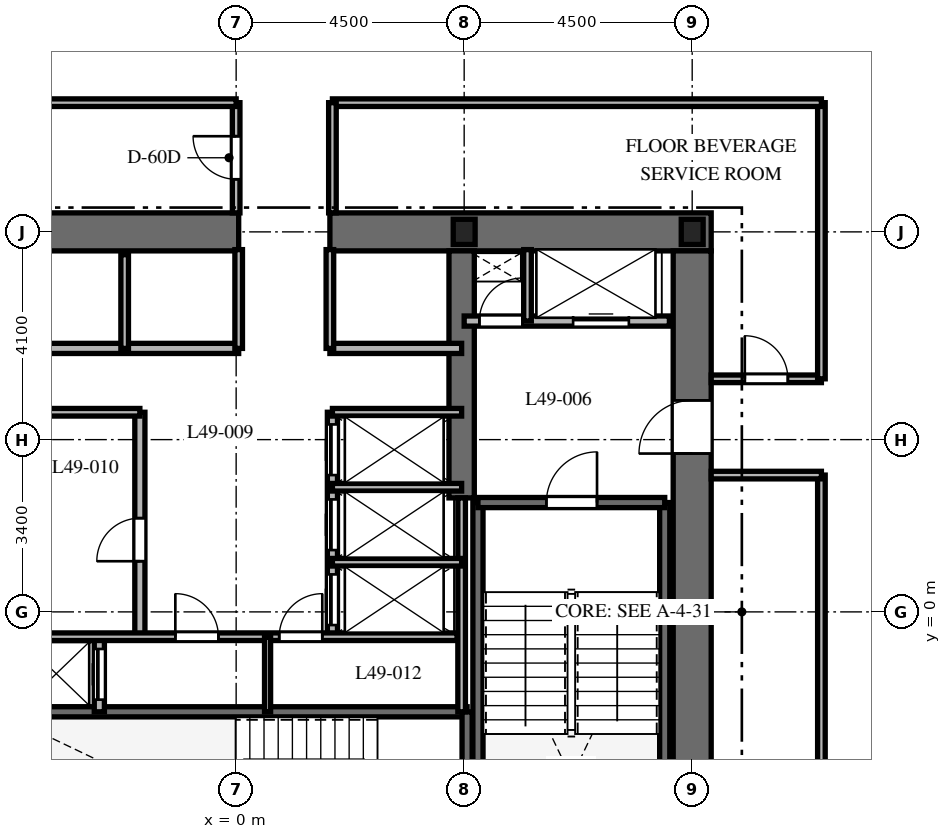
"""IFC4 building model, lengths in metres.
Left out: names, types, materials, properties, quantities, classifications, styles, units other than length and angle.
Written with IfcOpenShell. Run it as: python <this file> out.ifc"""

import sys

from ifc_helpers import new_model, si_unit, direction, frame, frame_2d, origin, origin_2d, place, context, subcontext, project, spatial, rectangle, i_section, extrude, element, fill, save


model = new_model("IFC4")
c1 = context("Model", 3, precision=1e-05, world=origin(), true_north=direction((0.0, 1.0)))
c2 = subcontext(c1, "Body", "Model", "MODEL_VIEW")
j1 = project(units=[si_unit("LENGTHUNIT", "METRE"), si_unit("PLANEANGLEUNIT", "RADIAN")], contexts=[c1])
p1 = place(None, origin())
s1 = spatial("IfcSite", under=j1, at=p1, CompositionType="ELEMENT")
p2 = place(p1, origin())
s2 = spatial("IfcBuilding", under=s1, at=p2, CompositionType="ELEMENT")
p3 = place(p2, frame((0.0, 0.0, 197.8)))
s3 = spatial("IfcBuildingStorey", under=s2, at=p3, CompositionType="ELEMENT", Elevation=197.8)
p4 = place(p3, frame((-9.375, 7.5, 0.0), z_axis=(0.0, 0.0, 1.0), x_axis=(1.0, 0.0, 0.0)))
e1 = element("IfcWall", 1, at=p4, inside=s3, PredefinedType="SHEAR", context=c2, shape_type="SweptSolid", body=[
    extrude(rectangle(XDim=9.425, YDim=0.75, at=frame_2d((4.712, 0.0))), origin(), (0.0, 0.0, 1.0), 3.7),
])
p5 = place(p3, frame((1.85, 7.5, 0.0), z_axis=(0.0, 0.0, 1.0), x_axis=(1.0, 0.0, 0.0)))
e2 = element("IfcWall", 2, at=p5, inside=s3, PredefinedType="SHEAR", context=c2, shape_type="SweptSolid", body=[
    extrude(rectangle(XDim=7.525, YDim=0.75, at=frame_2d((3.762, 0.0))), origin(), (0.0, 0.0, 1.0), 3.7),
])
p6 = place(p3, frame((9.0, -7.125, 0.0), z_axis=(0.0, 0.0, 1.0), x_axis=(0.0, 1.0, 0.0)))
e3 = element("IfcWall", 3, at=p6, inside=s3, PredefinedType="SHEAR", context=c2, shape_type="SweptSolid", body=[
    extrude(rectangle(XDim=14.25, YDim=0.75, at=frame_2d((7.125, 0.0))), origin(), (0.0, 0.0, 1.0), 3.7),
])
p7 = place(p6, frame((10.25, 0.0, 0.0)))
e4 = element("IfcOpeningElement", 4, at=p7, cuts=e3, PredefinedType="OPENING", context=c2, shape_type="SweptSolid", body=[
    extrude(rectangle(XDim=1.05, YDim=2.15, at=frame_2d((0.525, 1.075))), frame((0.0, 0.385, 0.0), z_axis=(0.0, -1.0, 0.0), x_axis=(1.0, 0.0, 0.0)), (0.0, 0.0, 1.0), 0.77),
])
p8 = place(p3, frame((4.45, 2.25, 0.0), z_axis=(0.0, 0.0, 1.0), x_axis=(0.0, 1.0, 0.0)))
e5 = element("IfcWall", 5, at=p8, inside=s3, PredefinedType="SHEAR", context=c2, shape_type="SweptSolid", body=[
    extrude(rectangle(XDim=4.875, YDim=0.5, at=frame_2d((2.438, 0.0))), origin(), (0.0, 0.0, 1.0), 3.7),
])
for number, where, z_axis, x_axis in (
    (6, (4.772, -6.985, 0.0), (0.0, 0.0, 1.0), (0.0, 1.0, 0.0)),
    (7, (8.458, -6.985, 0.0), (0.0, 0.0, 1.0), (0.0, 1.0, 0.0)),
):
    element("IfcWall", number, at=place(p3, frame(where, z_axis=z_axis, x_axis=x_axis)), inside=s3, PredefinedType="SHEAR", context=c2, shape_type="SweptSolid", body=[
        extrude(rectangle(XDim=9.143, YDim=0.2, at=frame_2d((4.572, 0.0))), origin(), (0.0, 0.0, 1.0), 3.7),
    ])
p9 = place(p3, frame((4.772, 2.158, 0.0), z_axis=(0.0, 0.0, 1.0), x_axis=(1.0, 0.0, 0.0)))
e8 = element("IfcWall", 8, at=p9, inside=s3, PredefinedType="SHEAR", context=c2, shape_type="SweptSolid", body=[
    extrude(rectangle(XDim=3.686, YDim=0.2, at=frame_2d((1.843, 0.0))), origin(), (0.0, 0.0, 1.0), 3.7),
])
p10 = place(p9, frame((1.35, 0.0, 0.0)))
e9 = element("IfcOpeningElement", 9, at=p10, cuts=e8, PredefinedType="OPENING", context=c2, shape_type="SweptSolid", body=[
    extrude(rectangle(XDim=1.0, YDim=2.15, at=frame_2d((0.5, 1.075))), frame((0.0, 0.11, 0.0), z_axis=(0.0, -1.0, 0.0), x_axis=(1.0, 0.0, 0.0)), (0.0, 0.0, 1.0), 0.22),
])
p11 = place(p3, frame((-4.608, -1.972, 0.0), z_axis=(0.0, 0.0, 1.0), x_axis=(1.0, 0.0, 0.0)))
e10 = element("IfcWall", 10, at=p11, inside=s3, PredefinedType="SHEAR", context=c2, shape_type="SweptSolid", body=[
    extrude(rectangle(XDim=9.166, YDim=0.2, at=frame_2d((4.583, 0.0))), origin(), (0.0, 0.0, 1.0), 3.7),
])
p12 = place(p3, frame((4.558, -5.658, 0.0), z_axis=(0.0, 0.0, 1.0), x_axis=(0.0, 1.0, 0.0)))
e11 = element("IfcWall", 11, at=p12, inside=s3, PredefinedType="SHEAR", context=c2, shape_type="SweptSolid", body=[
    extrude(rectangle(XDim=3.686, YDim=0.2, at=frame_2d((1.843, 0.0))), origin(), (0.0, 0.0, 1.0), 3.7),
])
for number, where, z_axis, x_axis in (
    (12, (9.0, 7.5, 0.0), (0.0, 0.0, 1.0), (1.0, 0.0, 0.0)),
    (13, (4.5, 7.5, 0.0), (0.0, 0.0, 1.0), (1.0, 0.0, 0.0)),
):
    element("IfcColumn", number, at=place(p3, frame(where, z_axis=z_axis, x_axis=x_axis)), inside=s3, PredefinedType="COLUMN", context=c2, shape_type="SweptSolid", body=[
        extrude(i_section(OverallWidth=0.432, OverallDepth=0.498, WebThickness=0.056, FlangeThickness=0.089, at=origin_2d()), origin(), (0.0, 0.0, 1.0), 3.7),
    ])
p13 = place(p3, frame((4.5, 5.74, 0.0), z_axis=(0.0, 0.0, 1.0), x_axis=(1.0, 0.0, 0.0)))
e14 = element("IfcWall", 14, at=p13, inside=s3, PredefinedType="PARTITIONING", context=c2, shape_type="SweptSolid", body=[
    extrude(rectangle(XDim=4.05, YDim=0.2, at=frame_2d((2.025, 0.0))), origin(), (0.0, 0.0, 1.0), 3.35),
])
p14 = place(p13, frame((0.3, 0.0, 0.0)))
e15 = element("IfcOpeningElement", 15, at=p14, cuts=e14, PredefinedType="OPENING", context=c2, shape_type="SweptSolid", body=[
    extrude(rectangle(XDim=0.85, YDim=2.03, at=frame_2d((0.425, 1.015))), frame((0.0, 0.11, 0.0), z_axis=(0.0, -1.0, 0.0), x_axis=(1.0, 0.0, 0.0)), (0.0, 0.0, 1.0), 0.22),
])
p15 = place(p13, frame((2.15, 0.0, 0.0)))
e16 = element("IfcOpeningElement", 16, at=p15, cuts=e14, PredefinedType="OPENING", context=c2, shape_type="SweptSolid", body=[
    extrude(rectangle(XDim=1.1, YDim=2.2, at=frame_2d((0.55, 1.1))), frame((0.0, 0.11, 0.0), z_axis=(0.0, -1.0, 0.0), x_axis=(1.0, 0.0, 0.0)), (0.0, 0.0, 1.0), 0.22),
])
p16 = place(p3, frame((5.75, 5.74, 0.0), z_axis=(0.0, 0.0, 1.0), x_axis=(0.0, 1.0, 0.0)))
e17 = element("IfcWall", 17, at=p16, inside=s3, PredefinedType="PARTITIONING", context=c2, shape_type="SweptSolid", body=[
    extrude(rectangle(XDim=1.41, YDim=0.15, at=frame_2d((0.705, 0.0))), origin(), (0.0, 0.0, 1.0), 3.35),
])
p17 = place(p3, frame((-2.7, -1.972, 0.0), z_axis=(0.0, 0.0, 1.0), x_axis=(0.0, 1.0, 0.0)))
e18 = element("IfcWall", 18, at=p17, inside=s3, PredefinedType="PARTITIONING", context=c2, shape_type="SweptSolid", body=[
    extrude(rectangle(XDim=1.472, YDim=0.2, at=frame_2d((0.736, 0.0))), origin(), (0.0, 0.0, 1.0), 3.35),
])
p18 = place(p17, frame((0.24, 0.0, 0.0)))
e19 = element("IfcOpeningElement", 19, at=p18, cuts=e18, PredefinedType="OPENING", context=c2, shape_type="SweptSolid", body=[
    extrude(rectangle(XDim=1.0, YDim=2.2, at=frame_2d((0.5, 1.1))), frame((0.0, 0.11, 0.0), z_axis=(0.0, -1.0, 0.0), x_axis=(1.0, 0.0, 0.0)), (0.0, 0.0, 1.0), 0.22),
])
p19 = place(p3, frame((-4.45, 5.2, 0.0), z_axis=(0.0, 0.0, 1.0), x_axis=(1.0, 0.0, 0.0)))
e20 = element("IfcWall", 20, at=p19, inside=s3, PredefinedType="PARTITIONING", context=c2, shape_type="SweptSolid", body=[
    extrude(rectangle(XDim=4.5, YDim=0.2, at=frame_2d((2.25, 0.0))), origin(), (0.0, 0.0, 1.0), 3.35),
])
p20 = place(p3, frame((1.85, 5.2, 0.0), z_axis=(0.0, 0.0, 1.0), x_axis=(1.0, 0.0, 0.0)))
e21 = element("IfcWall", 21, at=p20, inside=s3, PredefinedType="PARTITIONING", context=c2, shape_type="SweptSolid", body=[
    extrude(rectangle(XDim=2.6, YDim=0.2, at=frame_2d((1.3, 0.0))), origin(), (0.0, 0.0, 1.0), 3.35),
])
p21 = place(p3, frame((-2.2, 5.2, 0.0), z_axis=(0.0, 0.0, 1.0), x_axis=(0.0, 1.0, 0.0)))
e22 = element("IfcWall", 22, at=p21, inside=s3, PredefinedType="PARTITIONING", context=c2, shape_type="SweptSolid", body=[
    extrude(rectangle(XDim=1.85, YDim=0.15, at=frame_2d((0.925, 0.0))), origin(), (0.0, 0.0, 1.0), 3.35),
])
for number, where, z_axis, x_axis in (
    (23, (0.05, 5.2, 0.0), (0.0, 0.0, 1.0), (0.0, 1.0, 0.0)),
    (24, (1.85, 5.2, 0.0), (0.0, 0.0, 1.0), (0.0, 1.0, 0.0)),
):
    element("IfcWall", number, at=place(p3, frame(where, z_axis=z_axis, x_axis=x_axis)), inside=s3, PredefinedType="PARTITIONING", context=c2, shape_type="SweptSolid", body=[
        extrude(rectangle(XDim=1.95, YDim=0.15, at=frame_2d((0.975, 0.0))), origin(), (0.0, 0.0, 1.0), 3.35),
    ])
p22 = place(p3, frame((4.45, -1.972, 0.0), z_axis=(0.0, 0.0, 1.0), x_axis=(0.0, 1.0, 0.0)))
e25 = element("IfcWall", 25, at=p22, inside=s3, PredefinedType="PARTITIONING", context=c2, shape_type="SweptSolid", body=[
    extrude(rectangle(XDim=4.222, YDim=0.15, at=frame_2d((2.111, 0.0))), origin(), (0.0, 0.0, 1.0), 3.35),
])
p23 = place(p3, frame((-1.9, -0.5, 0.0), z_axis=(0.0, 0.0, 1.0), x_axis=(0.0, 1.0, 0.0)))
e26 = element("IfcWall", 26, at=p23, inside=s3, PredefinedType="PARTITIONING", context=c2, shape_type="SweptSolid", body=[
    extrude(rectangle(XDim=4.44, YDim=0.2, at=frame_2d((2.22, 0.0))), origin(), (0.0, 0.0, 1.0), 3.35),
])
p24 = place(p23, frame((1.5, 0.0, 0.0)))
e27 = element("IfcOpeningElement", 27, at=p24, cuts=e26, PredefinedType="OPENING", context=c2, shape_type="SweptSolid", body=[
    extrude(rectangle(XDim=0.85, YDim=2.03, at=frame_2d((0.425, 1.015))), frame((0.0, 0.11, 0.0), z_axis=(0.0, -1.0, 0.0), x_axis=(1.0, 0.0, 0.0)), (0.0, 0.0, 1.0), 0.22),
])
p25 = place(p3, frame((-4.45, 3.94, 0.0), z_axis=(0.0, 0.0, 1.0), x_axis=(1.0, 0.0, 0.0)))
e28 = element("IfcWall", 28, at=p25, inside=s3, PredefinedType="PARTITIONING", context=c2, shape_type="SweptSolid", body=[
    extrude(rectangle(XDim=2.55, YDim=0.15, at=frame_2d((1.275, 0.0))), origin(), (0.0, 0.0, 1.0), 3.35),
])
p26 = place(p3, frame((1.9, -0.5, 0.0), z_axis=(0.0, 0.0, 1.0), x_axis=(0.0, 1.0, 0.0)))
e29 = element("IfcWall", 29, at=p26, inside=s3, PredefinedType="PARTITIONING", context=c2, shape_type="SweptSolid", body=[
    extrude(rectangle(XDim=4.44, YDim=0.2, at=frame_2d((2.22, 0.0))), origin(), (0.0, 0.0, 1.0), 3.35),
])
p27 = place(p26, frame((0.24, 0.0, 0.0)))
e30 = element("IfcOpeningElement", 30, at=p27, cuts=e29, PredefinedType="OPENING", context=c2, shape_type="SweptSolid", body=[
    extrude(rectangle(XDim=1.0, YDim=2.2, at=frame_2d((0.5, 1.1))), frame((0.0, 0.11, 0.0), z_axis=(0.0, -1.0, 0.0), x_axis=(1.0, 0.0, 0.0)), (0.0, 0.0, 1.0), 0.22),
])
p28 = place(p26, frame((1.72, 0.0, 0.0)))
e31 = element("IfcOpeningElement", 31, at=p28, cuts=e29, PredefinedType="OPENING", context=c2, shape_type="SweptSolid", body=[
    extrude(rectangle(XDim=1.0, YDim=2.2, at=frame_2d((0.5, 1.1))), frame((0.0, 0.11, 0.0), z_axis=(0.0, -1.0, 0.0), x_axis=(1.0, 0.0, 0.0)), (0.0, 0.0, 1.0), 0.22),
])
p29 = place(p26, frame((3.2, 0.0, 0.0)))
e32 = element("IfcOpeningElement", 32, at=p29, cuts=e29, PredefinedType="OPENING", context=c2, shape_type="SweptSolid", body=[
    extrude(rectangle(XDim=1.0, YDim=2.2, at=frame_2d((0.5, 1.1))), frame((0.0, 0.11, 0.0), z_axis=(0.0, -1.0, 0.0), x_axis=(1.0, 0.0, 0.0)), (0.0, 0.0, 1.0), 0.22),
])
for number, where, z_axis, x_axis in (
    (33, (1.9, 3.94, 0.0), (0.0, 0.0, 1.0), (1.0, 0.0, 0.0)),
    (34, (1.9, 0.98, 0.0), (0.0, 0.0, 1.0), (1.0, 0.0, 0.0)),
    (35, (1.9, 2.46, 0.0), (0.0, 0.0, 1.0), (1.0, 0.0, 0.0)),
):
    element("IfcWall", number, at=place(p3, frame(where, z_axis=z_axis, x_axis=x_axis)), inside=s3, PredefinedType="PARTITIONING", context=c2, shape_type="SweptSolid", body=[
        extrude(rectangle(XDim=2.55, YDim=0.15, at=frame_2d((1.275, 0.0))), origin(), (0.0, 0.0, 1.0), 3.35),
    ])
p30 = place(p3, frame((-4.36, -0.49, 0.0), z_axis=(0.0, 0.0, 1.0), x_axis=(1.0, 0.0, 0.0)))
e36 = element("IfcWall", 36, at=p30, inside=s3, PredefinedType="PARTITIONING", context=c2, shape_type="SweptSolid", body=[
    extrude(rectangle(XDim=8.72, YDim=0.15, at=frame_2d((4.36, 0.0))), origin(), (0.0, 0.0, 1.0), 3.35),
])
p31 = place(p30, frame((3.16, 0.0, 0.0)))
e37 = element("IfcOpeningElement", 37, at=p31, cuts=e36, PredefinedType="OPENING", context=c2, shape_type="SweptSolid", body=[
    extrude(rectangle(XDim=0.85, YDim=2.03, at=frame_2d((0.425, 1.015))), frame((0.0, 0.085, 0.0), z_axis=(0.0, -1.0, 0.0), x_axis=(1.0, 0.0, 0.0)), (0.0, 0.0, 1.0), 0.17),
])
p32 = place(p30, frame((5.21, 0.0, 0.0)))
e38 = element("IfcOpeningElement", 38, at=p32, cuts=e36, PredefinedType="OPENING", context=c2, shape_type="SweptSolid", body=[
    extrude(rectangle(XDim=0.85, YDim=2.03, at=frame_2d((0.425, 1.015))), frame((0.0, 0.085, 0.0), z_axis=(0.0, -1.0, 0.0), x_axis=(1.0, 0.0, 0.0)), (0.0, 0.0, 1.0), 0.17),
])
p33 = place(p3, frame((0.62, -1.972, 0.0), z_axis=(0.0, 0.0, 1.0), x_axis=(0.0, 1.0, 0.0)))
e39 = element("IfcWall", 39, at=p33, inside=s3, PredefinedType="PARTITIONING", context=c2, shape_type="SweptSolid", body=[
    extrude(rectangle(XDim=1.472, YDim=0.12, at=frame_2d((0.736, 0.0))), origin(), (0.0, 0.0, 1.0), 3.35),
])
p34 = place(p3, frame((11.55, -10.05, 0.0), z_axis=(0.0, 0.0, 1.0), x_axis=(0.0, 1.0, 0.0)))
e40 = element("IfcWall", 40, at=p34, inside=s3, PredefinedType="PARTITIONING", context=c2, shape_type="SweptSolid", body=[
    extrude(rectangle(XDim=12.75, YDim=0.15, at=frame_2d((6.375, 0.0))), origin(), (0.0, 0.0, 1.0), 2.79),
])
p35 = place(p34, frame((5.95, 0.0, 0.0)))
e41 = element("IfcOpeningElement", 41, at=p35, cuts=e40, PredefinedType="OPENING", context=c2, shape_type="SweptSolid", body=[
    extrude(rectangle(XDim=0.85, YDim=2.03, at=frame_2d((0.425, 1.015))), frame((0.0, 0.085, 0.0), z_axis=(0.0, -1.0, 0.0), x_axis=(1.0, 0.0, 0.0)), (0.0, 0.0, 1.0), 0.17),
])
p36 = place(p3, frame((11.55, 2.7, 0.0), z_axis=(0.0, 0.0, 1.0), x_axis=(-1.0, 0.0, 0.0)))
e42 = element("IfcWall", 42, at=p36, inside=s3, PredefinedType="PARTITIONING", context=c2, shape_type="SweptSolid", body=[
    extrude(rectangle(XDim=2.175, YDim=0.15, at=frame_2d((1.087, 0.0))), origin(), (0.0, 0.0, 1.0), 3.35),
])
p37 = place(p3, frame((9.375, 4.6, 0.0), z_axis=(0.0, 0.0, 1.0), x_axis=(1.0, 0.0, 0.0)))
e43 = element("IfcWall", 43, at=p37, inside=s3, PredefinedType="PARTITIONING", context=c2, shape_type="SweptSolid", body=[
    extrude(rectangle(XDim=2.175, YDim=0.15, at=frame_2d((1.087, 0.0))), origin(), (0.0, 0.0, 1.0), 3.35),
])
p38 = place(p37, frame((0.663, 0.0, 0.0)))
e44 = element("IfcOpeningElement", 44, at=p38, cuts=e43, PredefinedType="OPENING", context=c2, shape_type="SweptSolid", body=[
    extrude(rectangle(XDim=0.85, YDim=2.03, at=frame_2d((0.425, 1.015))), frame((0.0, 0.085, 0.0), z_axis=(0.0, -1.0, 0.0), x_axis=(1.0, 0.0, 0.0)), (0.0, 0.0, 1.0), 0.17),
])
p39 = place(p3, frame((11.55, 4.6, 0.0), z_axis=(0.0, 0.0, 1.0), x_axis=(0.0, 1.0, 0.0)))
e45 = element("IfcWall", 45, at=p39, inside=s3, PredefinedType="PARTITIONING", context=c2, shape_type="SweptSolid", body=[
    extrude(rectangle(XDim=5.45, YDim=0.15, at=frame_2d((2.725, 0.0))), origin(), (0.0, 0.0, 1.0), 2.79),
])
p40 = place(p3, frame((11.55, 10.05, 0.0), z_axis=(0.0, 0.0, 1.0), x_axis=(-1.0, 0.0, 0.0)))
e46 = element("IfcWall", 46, at=p40, inside=s3, PredefinedType="PARTITIONING", context=c2, shape_type="SweptSolid", body=[
    extrude(rectangle(XDim=9.65, YDim=0.15, at=frame_2d((4.825, 0.0))), origin(), (0.0, 0.0, 1.0), 2.79),
])
p41 = place(p3, frame((1.9, 10.05, 0.0), z_axis=(0.0, 0.0, 1.0), x_axis=(0.0, -1.0, 0.0)))
e47 = element("IfcWall", 47, at=p41, inside=s3, PredefinedType="PARTITIONING", context=c2, shape_type="SweptSolid", body=[
    extrude(rectangle(XDim=2.175, YDim=0.15, at=frame_2d((1.087, 0.0))), origin(), (0.0, 0.0, 1.0), 3.35),
])
p42 = place(p3, frame((0.0, 7.875, 0.0), z_axis=(0.0, 0.0, 1.0), x_axis=(0.0, 1.0, 0.0)))
e48 = element("IfcWall", 48, at=p42, inside=s3, PredefinedType="PARTITIONING", context=c2, shape_type="SweptSolid", body=[
    extrude(rectangle(XDim=2.175, YDim=0.15, at=frame_2d((1.087, 0.0))), origin(), (0.0, 0.0, 1.0), 3.35),
])
p43 = place(p42, frame((0.663, 0.0, 0.0)))
e49 = element("IfcOpeningElement", 49, at=p43, cuts=e48, PredefinedType="OPENING", context=c2, shape_type="SweptSolid", body=[
    extrude(rectangle(XDim=0.85, YDim=2.03, at=frame_2d((0.425, 1.015))), frame((0.0, 0.085, 0.0), z_axis=(0.0, -1.0, 0.0), x_axis=(1.0, 0.0, 0.0)), (0.0, 0.0, 1.0), 0.17),
])
p44 = place(p3, frame((0.0, 10.05, 0.0), z_axis=(0.0, 0.0, 1.0), x_axis=(-1.0, 0.0, 0.0)))
e50 = element("IfcWall", 50, at=p44, inside=s3, PredefinedType="PARTITIONING", context=c2, shape_type="SweptSolid", body=[
    extrude(rectangle(XDim=11.55, YDim=0.15, at=frame_2d((5.775, 0.0))), origin(), (0.0, 0.0, 1.0), 2.79),
])
p45 = place(p10, origin())
e51 = element("IfcDoor", 51, at=p45, inside=s3, OperationType="SINGLE_SWING_RIGHT", PredefinedType="DOOR", context=c2, shape_type="SweptSolid", body=[
    extrude(rectangle(XDim=1.0, YDim=2.15, at=frame_2d((0.5, 1.075))), frame((0.0, 0.025, 0.0), z_axis=(0.0, -1.0, 0.0), x_axis=(1.0, 0.0, 0.0)), (0.0, 0.0, 1.0), 0.05),
])
fill(e9, e51)
p46 = place(p7, origin())
e52 = element("IfcDoor", 52, at=p46, inside=s3, OperationType="SINGLE_SWING_LEFT", PredefinedType="DOOR", context=c2, shape_type="SweptSolid", body=[
    extrude(rectangle(XDim=1.05, YDim=2.15, at=frame_2d((0.525, 1.075))), frame((0.0, 0.025, 0.0), z_axis=(0.0, -1.0, 0.0), x_axis=(1.0, 0.0, 0.0)), (0.0, 0.0, 1.0), 0.05),
])
fill(e4, e52)
p47 = place(p14, origin())
e53 = element("IfcDoor", 53, at=p47, inside=s3, OperationType="SINGLE_SWING_RIGHT", PredefinedType="DOOR", context=c2, shape_type="SweptSolid", body=[
    extrude(rectangle(XDim=0.85, YDim=2.03, at=frame_2d((0.425, 1.015))), frame((0.0, 0.025, 0.0), z_axis=(0.0, -1.0, 0.0), x_axis=(1.0, 0.0, 0.0)), (0.0, 0.0, 1.0), 0.05),
])
fill(e15, e53)
p48 = place(p15, origin())
e54 = element("IfcDoor", 54, at=p48, inside=s3, OperationType="SLIDING_TO_RIGHT", PredefinedType="DOOR", context=c2, shape_type="SweptSolid", body=[
    extrude(rectangle(XDim=1.1, YDim=2.2, at=frame_2d((0.55, 1.1))), frame((0.0, 0.025, 0.0), z_axis=(0.0, -1.0, 0.0), x_axis=(1.0, 0.0, 0.0)), (0.0, 0.0, 1.0), 0.05),
])
fill(e16, e54)
p49 = place(p18, origin())
e55 = element("IfcDoor", 55, at=p49, inside=s3, OperationType="SLIDING_TO_LEFT", PredefinedType="DOOR", context=c2, shape_type="SweptSolid", body=[
    extrude(rectangle(XDim=1.0, YDim=2.2, at=frame_2d((0.5, 1.1))), frame((0.0, 0.025, 0.0), z_axis=(0.0, -1.0, 0.0), x_axis=(1.0, 0.0, 0.0)), (0.0, 0.0, 1.0), 0.05),
])
fill(e19, e55)
p50 = place(p24, origin())
e56 = element("IfcDoor", 56, at=p50, inside=s3, OperationType="SINGLE_SWING_LEFT", PredefinedType="DOOR", context=c2, shape_type="SweptSolid", body=[
    extrude(rectangle(XDim=0.85, YDim=2.03, at=frame_2d((0.425, 1.015))), frame((0.0, 0.025, 0.0), z_axis=(0.0, -1.0, 0.0), x_axis=(1.0, 0.0, 0.0)), (0.0, 0.0, 1.0), 0.05),
])
fill(e27, e56)
p51 = place(p27, origin())
e57 = element("IfcDoor", 57, at=p51, inside=s3, OperationType="SLIDING_TO_RIGHT", PredefinedType="DOOR", context=c2, shape_type="SweptSolid", body=[
    extrude(rectangle(XDim=1.0, YDim=2.2, at=frame_2d((0.5, 1.1))), frame((0.0, 0.025, 0.0), z_axis=(0.0, -1.0, 0.0), x_axis=(1.0, 0.0, 0.0)), (0.0, 0.0, 1.0), 0.05),
])
fill(e30, e57)
p52 = place(p28, origin())
e58 = element("IfcDoor", 58, at=p52, inside=s3, OperationType="SLIDING_TO_RIGHT", PredefinedType="DOOR", context=c2, shape_type="SweptSolid", body=[
    extrude(rectangle(XDim=1.0, YDim=2.2, at=frame_2d((0.5, 1.1))), frame((0.0, 0.025, 0.0), z_axis=(0.0, -1.0, 0.0), x_axis=(1.0, 0.0, 0.0)), (0.0, 0.0, 1.0), 0.05),
])
fill(e31, e58)
p53 = place(p29, origin())
e59 = element("IfcDoor", 59, at=p53, inside=s3, OperationType="SLIDING_TO_RIGHT", PredefinedType="DOOR", context=c2, shape_type="SweptSolid", body=[
    extrude(rectangle(XDim=1.0, YDim=2.2, at=frame_2d((0.5, 1.1))), frame((0.0, 0.025, 0.0), z_axis=(0.0, -1.0, 0.0), x_axis=(1.0, 0.0, 0.0)), (0.0, 0.0, 1.0), 0.05),
])
fill(e32, e59)
p54 = place(p31, origin())
e60 = element("IfcDoor", 60, at=p54, inside=s3, OperationType="SINGLE_SWING_LEFT", PredefinedType="DOOR", context=c2, shape_type="SweptSolid", body=[
    extrude(rectangle(XDim=0.85, YDim=2.03, at=frame_2d((0.425, 1.015))), frame((0.0, 0.025, 0.0), z_axis=(0.0, -1.0, 0.0), x_axis=(1.0, 0.0, 0.0)), (0.0, 0.0, 1.0), 0.05),
])
fill(e37, e60)
p55 = place(p32, origin())
e61 = element("IfcDoor", 61, at=p55, inside=s3, OperationType="SINGLE_SWING_RIGHT", PredefinedType="DOOR", context=c2, shape_type="SweptSolid", body=[
    extrude(rectangle(XDim=0.85, YDim=2.03, at=frame_2d((0.425, 1.015))), frame((0.0, 0.025, 0.0), z_axis=(0.0, -1.0, 0.0), x_axis=(1.0, 0.0, 0.0)), (0.0, 0.0, 1.0), 0.05),
])
fill(e38, e61)
p56 = place(p43, origin())
e62 = element("IfcDoor", 62, at=p56, inside=s3, OperationType="SINGLE_SWING_RIGHT", PredefinedType="DOOR", context=c2, shape_type="SweptSolid", body=[
    extrude(rectangle(XDim=0.85, YDim=2.03, at=frame_2d((0.425, 1.015))), frame((0.0, 0.025, 0.0), z_axis=(0.0, -1.0, 0.0), x_axis=(1.0, 0.0, 0.0)), (0.0, 0.0, 1.0), 0.05),
])
fill(e49, e62)
p57 = place(p38, origin())
e63 = element("IfcDoor", 63, at=p57, inside=s3, OperationType="SINGLE_SWING_LEFT", PredefinedType="DOOR", context=c2, shape_type="SweptSolid", body=[
    extrude(rectangle(XDim=0.85, YDim=2.03, at=frame_2d((0.425, 1.015))), frame((0.0, 0.025, 0.0), z_axis=(0.0, -1.0, 0.0), x_axis=(1.0, 0.0, 0.0)), (0.0, 0.0, 1.0), 0.05),
])
fill(e44, e63)
save(model, sys.argv[1])
